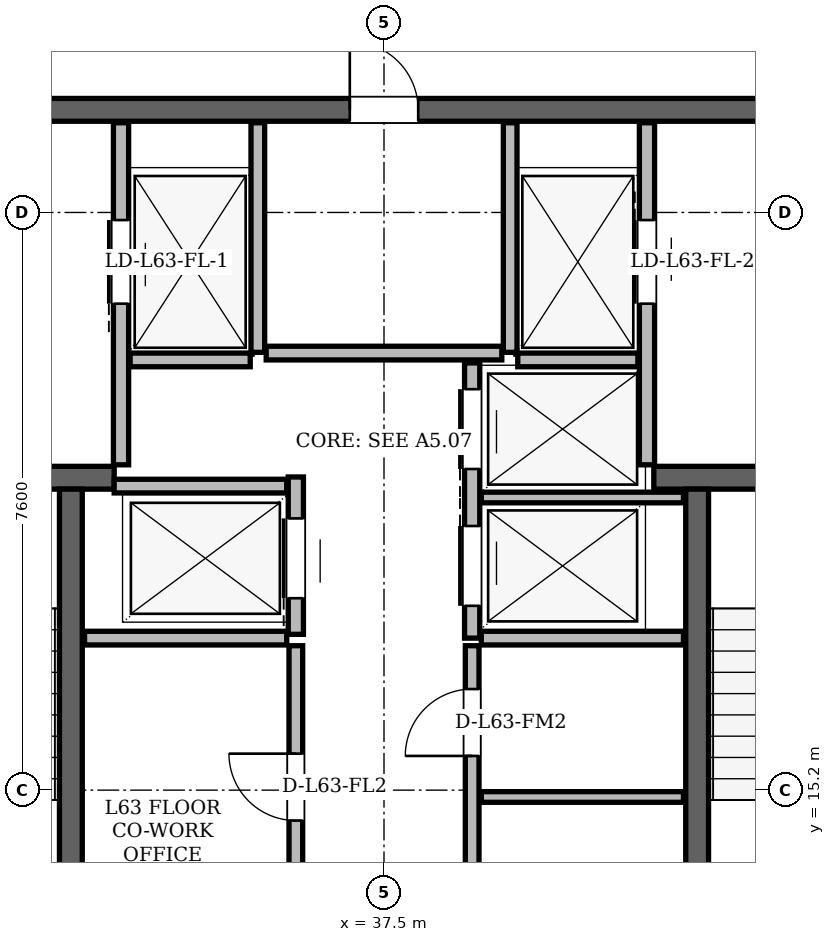
"""IFC4 building model, lengths in metres.
Left out: names, types, materials, properties, quantities, classifications, styles, units other than length and angle.
Written with IfcOpenShell. Run it as: python <this file> out.ifc"""

import sys

from ifc_helpers import new_model, si_unit, direction, frame, frame_2d, origin, place, context, subcontext, project, spatial, rectangle, extrude, element, fill, save


model = new_model("IFC4")
c1 = context("Model", 3, precision=1e-05, world=origin(), true_north=direction((0.0, 1.0)))
c2 = subcontext(c1, "Body", "Model", "MODEL_VIEW")
j1 = project(units=[si_unit("LENGTHUNIT", "METRE"), si_unit("PLANEANGLEUNIT", "RADIAN")], contexts=[c1])
p1 = place(None, origin())
s1 = spatial("IfcSite", under=j1, at=p1, CompositionType="ELEMENT")
p2 = place(p1, origin())
s2 = spatial("IfcBuilding", under=s1, at=p2, CompositionType="ELEMENT")
p3 = place(p2, frame((0.0, 0.0, 237.9)))
s3 = spatial("IfcBuildingStorey", under=s2, at=p3, CompositionType="ELEMENT", Elevation=237.9)
p4 = place(p3, frame((29.65, 24.15, 0.0), z_axis=(0.0, 0.0, 1.0), x_axis=(1.0, 0.0, 0.0)))
e1 = element("IfcWall", 1, at=p4, inside=s3, PredefinedType="SHEAR", context=c2, shape_type="SweptSolid", body=[
    extrude(rectangle(XDim=15.7, YDim=0.3, at=frame_2d((7.85, 0.0))), origin(), (0.0, 0.0, 1.0), 3.38),
])
p5 = place(p4, frame((1.7, 0.0, 0.0)))
e2 = element("IfcOpeningElement", 2, at=p5, cuts=e1, PredefinedType="OPENING", context=c2, shape_type="SweptSolid", body=[
    extrude(rectangle(XDim=1.2, YDim=2.2, at=frame_2d((0.6, 1.1))), frame((0.0, 0.15, 0.0), z_axis=(0.0, -1.0, 0.0), x_axis=(1.0, 0.0, 0.0)), (0.0, 0.0, 1.0), 0.3),
])
p6 = place(p4, frame((12.8, 0.0, 0.0)))
e3 = element("IfcOpeningElement", 3, at=p6, cuts=e1, PredefinedType="OPENING", context=c2, shape_type="SweptSolid", body=[
    extrude(rectangle(XDim=1.2, YDim=2.2, at=frame_2d((0.6, 1.1))), frame((0.0, 0.15, 0.0), z_axis=(0.0, -1.0, 0.0), x_axis=(1.0, 0.0, 0.0)), (0.0, 0.0, 1.0), 0.3),
])
p7 = place(p4, frame((7.4, 0.0, 0.0)))
e4 = element("IfcOpeningElement", 4, at=p7, cuts=e1, PredefinedType="OPENING", context=c2, shape_type="SweptSolid", body=[
    extrude(rectangle(XDim=0.9, YDim=2.05, at=frame_2d((0.45, 1.025))), frame((0.0, 0.15, 0.0), z_axis=(0.0, -1.0, 0.0), x_axis=(1.0, 0.0, 0.0)), (0.0, 0.0, 1.0), 0.3),
])
p8 = place(p3, frame((29.94, 19.31, 0.0), z_axis=(0.0, 0.0, 1.0), x_axis=(1.0, 0.0, 0.0)))
e5 = element("IfcWall", 5, at=p8, inside=s3, PredefinedType="SHEAR", context=c2, shape_type="SweptSolid", body=[
    extrude(rectangle(XDim=4.01, YDim=0.3, at=frame_2d((2.005, 0.0))), origin(), (0.0, 0.0, 1.0), 3.38),
])
p9 = place(p8, frame((1.01, 0.0, 0.0)))
e6 = element("IfcOpeningElement", 6, at=p9, cuts=e5, PredefinedType="OPENING", context=c2, shape_type="SweptSolid", body=[
    extrude(rectangle(XDim=1.4, YDim=2.2, at=frame_2d((0.7, 1.1))), frame((0.0, 0.15, 0.0), z_axis=(0.0, -1.0, 0.0), x_axis=(1.0, 0.0, 0.0)), (0.0, 0.0, 1.0), 0.3),
])
p10 = place(p3, frame((41.05, 19.31, 0.0), z_axis=(0.0, 0.0, 1.0), x_axis=(1.0, 0.0, 0.0)))
e7 = element("IfcWall", 7, at=p10, inside=s3, PredefinedType="SHEAR", context=c2, shape_type="SweptSolid", body=[
    extrude(rectangle(XDim=4.01, YDim=0.3, at=frame_2d((2.005, 0.0))), origin(), (0.0, 0.0, 1.0), 3.38),
])
p11 = place(p10, frame((1.6, 0.0, 0.0)))
e8 = element("IfcOpeningElement", 8, at=p11, cuts=e7, PredefinedType="OPENING", context=c2, shape_type="SweptSolid", body=[
    extrude(rectangle(XDim=1.4, YDim=2.2, at=frame_2d((0.7, 1.1))), frame((0.0, 0.15, 0.0), z_axis=(0.0, -1.0, 0.0), x_axis=(1.0, 0.0, 0.0)), (0.0, 0.0, 1.0), 0.3),
])
for number, where, z_axis, x_axis in (
    (9, (33.38, 11.54, 0.0), (0.0, 0.0, 1.0), (0.0, 1.0, 0.0)),
    (10, (41.62, 11.54, 0.0), (0.0, 0.0, 1.0), (0.0, 1.0, 0.0)),
):
    element("IfcWall", number, at=place(p3, frame(where, z_axis=z_axis, x_axis=x_axis)), inside=s3, PredefinedType="SHEAR", context=c2, shape_type="SweptSolid", body=[
        extrude(rectangle(XDim=7.62, YDim=0.3, at=frame_2d((3.81, 0.0))), origin(), (0.0, 0.0, 1.0), 3.38),
    ])
p12 = place(p3, frame((58.899, 11.151, 0.0), z_axis=(0.0, 0.0, 1.0), x_axis=(-0.500002325133, 0.866024061364, 0.0)))
e11 = element("IfcWall", 11, at=p12, inside=s3, PredefinedType="SOLIDWALL", context=c2, shape_type="SweptSolid", body=[
    extrude(rectangle(XDim=36.9, YDim=0.29, at=frame_2d((18.45, 0.0))), origin(), (0.0, 0.0, 1.0), 2.677),
])
p13 = place(p12, frame((3.429, 0.0, 0.0)))
e12 = element("IfcOpeningElement", 12, at=p13, cuts=e11, PredefinedType="OPENING", context=c2, shape_type="SweptSolid", body=[
    extrude(rectangle(XDim=1.5, YDim=2.2, at=frame_2d((0.75, 1.1))), frame((0.0, 0.145, 0.0), z_axis=(0.0, -1.0, 0.0), x_axis=(1.0, 0.0, 0.0)), (0.0, 0.0, 1.0), 0.29),
])
p14 = place(p12, frame((27.156, 0.0, 0.0)))
e13 = element("IfcOpeningElement", 13, at=p14, cuts=e11, PredefinedType="OPENING", context=c2, shape_type="SweptSolid", body=[
    extrude(rectangle(XDim=1.5, YDim=2.2, at=frame_2d((0.75, 1.1))), frame((0.0, 0.145, 0.0), z_axis=(0.0, -1.0, 0.0), x_axis=(1.0, 0.0, 0.0)), (0.0, 0.0, 1.0), 0.29),
])
p15 = place(p12, frame((6.97, 0.0, 0.85)))
e14 = element("IfcOpeningElement", 14, at=p15, cuts=e11, PredefinedType="OPENING", context=c2, shape_type="SweptSolid", body=[
    extrude(rectangle(XDim=1.6, YDim=1.7, at=frame_2d((0.8, 0.85))), frame((0.0, 0.145, 0.0), z_axis=(0.0, -1.0, 0.0), x_axis=(1.0, 0.0, 0.0)), (0.0, 0.0, 1.0), 0.29),
])
p16 = place(p12, frame((1.106, 0.0, 0.85)))
e15 = element("IfcOpeningElement", 15, at=p16, cuts=e11, PredefinedType="OPENING", context=c2, shape_type="SweptSolid", body=[
    extrude(rectangle(XDim=1.6, YDim=1.7, at=frame_2d((0.8, 0.85))), frame((0.0, 0.145, 0.0), z_axis=(0.0, -1.0, 0.0), x_axis=(1.0, 0.0, 0.0)), (0.0, 0.0, 1.0), 0.29),
])
p17 = place(p12, frame((34.697, 0.0, 0.85)))
e16 = element("IfcOpeningElement", 16, at=p17, cuts=e11, PredefinedType="OPENING", context=c2, shape_type="SweptSolid", body=[
    extrude(rectangle(XDim=1.2, YDim=1.48, at=frame_2d((0.6, 0.74))), frame((0.0, 0.145, 0.0), z_axis=(0.0, -1.0, 0.0), x_axis=(1.0, 0.0, 0.0)), (0.0, 0.0, 1.0), 0.29),
])
p18 = place(p12, frame((16.774, 0.0, 0.85)))
e17 = element("IfcOpeningElement", 17, at=p18, cuts=e11, PredefinedType="OPENING", context=c2, shape_type="SweptSolid", body=[
    extrude(rectangle(XDim=2.2, YDim=1.717, at=frame_2d((1.1, 0.858))), frame((0.0, 0.145, 0.0), z_axis=(0.0, -1.0, 0.0), x_axis=(1.0, 0.0, 0.0)), (0.0, 0.0, 1.0), 0.29),
])
p19 = place(p12, frame((22.799, 0.0, 0.85)))
e18 = element("IfcOpeningElement", 18, at=p19, cuts=e11, PredefinedType="OPENING", context=c2, shape_type="SweptSolid", body=[
    extrude(rectangle(XDim=1.6, YDim=1.7, at=frame_2d((0.8, 0.85))), frame((0.0, 0.145, 0.0), z_axis=(0.0, -1.0, 0.0), x_axis=(1.0, 0.0, 0.0)), (0.0, 0.0, 1.0), 0.29),
])
p20 = place(p12, frame((29.059, 0.0, 0.85)))
e19 = element("IfcOpeningElement", 19, at=p20, cuts=e11, PredefinedType="OPENING", context=c2, shape_type="SweptSolid", body=[
    extrude(rectangle(XDim=1.2, YDim=1.48, at=frame_2d((0.6, 0.74))), frame((0.0, 0.145, 0.0), z_axis=(0.0, -1.0, 0.0), x_axis=(1.0, 0.0, 0.0)), (0.0, 0.0, 1.0), 0.29),
])
p21 = place(p12, frame((31.635, 0.0, 0.85)))
e20 = element("IfcOpeningElement", 20, at=p21, cuts=e11, PredefinedType="OPENING", context=c2, shape_type="SweptSolid", body=[
    extrude(rectangle(XDim=1.2, YDim=1.48, at=frame_2d((0.6, 0.74))), frame((0.0, 0.145, 0.0), z_axis=(0.0, -1.0, 0.0), x_axis=(1.0, 0.0, 0.0)), (0.0, 0.0, 1.0), 0.29),
])
p22 = place(p12, frame((12.419, 0.0, 0.85)))
e21 = element("IfcOpeningElement", 21, at=p22, cuts=e11, PredefinedType="OPENING", context=c2, shape_type="SweptSolid", body=[
    extrude(rectangle(XDim=1.2, YDim=1.48, at=frame_2d((0.6, 0.74))), frame((0.0, 0.145, 0.0), z_axis=(0.0, -1.0, 0.0), x_axis=(1.0, 0.0, 0.0)), (0.0, 0.0, 1.0), 0.29),
])
p23 = place(p3, frame((34.551, 43.107, 0.0), z_axis=(0.0, 0.0, 1.0), x_axis=(-0.500002325133, -0.866024061364, 0.0)))
e22 = element("IfcWall", 22, at=p23, inside=s3, PredefinedType="SOLIDWALL", context=c2, shape_type="SweptSolid", body=[
    extrude(rectangle(XDim=36.9, YDim=0.29, at=frame_2d((18.45, 0.0))), origin(), (0.0, 0.0, 1.0), 2.677),
])
p24 = place(p23, frame((3.429, 0.0, 0.0)))
e23 = element("IfcOpeningElement", 23, at=p24, cuts=e22, PredefinedType="OPENING", context=c2, shape_type="SweptSolid", body=[
    extrude(rectangle(XDim=1.5, YDim=2.2, at=frame_2d((0.75, 1.1))), frame((0.0, 0.145, 0.0), z_axis=(0.0, -1.0, 0.0), x_axis=(1.0, 0.0, 0.0)), (0.0, 0.0, 1.0), 0.29),
])
p25 = place(p23, frame((28.625, 0.0, 0.0)))
e24 = element("IfcOpeningElement", 24, at=p25, cuts=e22, PredefinedType="OPENING", context=c2, shape_type="SweptSolid", body=[
    extrude(rectangle(XDim=1.5, YDim=2.2, at=frame_2d((0.75, 1.1))), frame((0.0, 0.145, 0.0), z_axis=(0.0, -1.0, 0.0), x_axis=(1.0, 0.0, 0.0)), (0.0, 0.0, 1.0), 0.29),
])
p26 = place(p23, frame((21.887, 0.0, 0.85)))
e25 = element("IfcOpeningElement", 25, at=p26, cuts=e22, PredefinedType="OPENING", context=c2, shape_type="SweptSolid", body=[
    extrude(rectangle(XDim=2.4, YDim=1.717, at=frame_2d((1.2, 0.858))), frame((0.0, 0.145, 0.0), z_axis=(0.0, -1.0, 0.0), x_axis=(1.0, 0.0, 0.0)), (0.0, 0.0, 1.0), 0.29),
])
p27 = place(p23, frame((34.716, 0.0, 0.85)))
e26 = element("IfcOpeningElement", 26, at=p27, cuts=e22, PredefinedType="OPENING", context=c2, shape_type="SweptSolid", body=[
    extrude(rectangle(XDim=1.2, YDim=1.48, at=frame_2d((0.6, 0.74))), frame((0.0, 0.145, 0.0), z_axis=(0.0, -1.0, 0.0), x_axis=(1.0, 0.0, 0.0)), (0.0, 0.0, 1.0), 0.29),
])
p28 = place(p23, frame((32.59, 0.0, 0.85)))
e27 = element("IfcOpeningElement", 27, at=p28, cuts=e22, PredefinedType="OPENING", context=c2, shape_type="SweptSolid", body=[
    extrude(rectangle(XDim=1.2, YDim=1.48, at=frame_2d((0.6, 0.74))), frame((0.0, 0.145, 0.0), z_axis=(0.0, -1.0, 0.0), x_axis=(1.0, 0.0, 0.0)), (0.0, 0.0, 1.0), 0.29),
])
p29 = place(p23, frame((12.187, 0.0, 0.85)))
e28 = element("IfcOpeningElement", 28, at=p29, cuts=e22, PredefinedType="OPENING", context=c2, shape_type="SweptSolid", body=[
    extrude(rectangle(XDim=1.2, YDim=1.48, at=frame_2d((0.6, 0.74))), frame((0.0, 0.145, 0.0), z_axis=(0.0, -1.0, 0.0), x_axis=(1.0, 0.0, 0.0)), (0.0, 0.0, 1.0), 0.29),
])
p30 = place(p23, frame((16.565, 0.0, 0.85)))
e29 = element("IfcOpeningElement", 29, at=p30, cuts=e22, PredefinedType="OPENING", context=c2, shape_type="SweptSolid", body=[
    extrude(rectangle(XDim=2.0, YDim=1.717, at=frame_2d((1.0, 0.858))), frame((0.0, 0.145, 0.0), z_axis=(0.0, -1.0, 0.0), x_axis=(1.0, 0.0, 0.0)), (0.0, 0.0, 1.0), 0.29),
])
p31 = place(p23, frame((6.94, 0.0, 0.85)))
e30 = element("IfcOpeningElement", 30, at=p31, cuts=e22, PredefinedType="OPENING", context=c2, shape_type="SweptSolid", body=[
    extrude(rectangle(XDim=1.2, YDim=1.48, at=frame_2d((0.6, 0.74))), frame((0.0, 0.145, 0.0), z_axis=(0.0, -1.0, 0.0), x_axis=(1.0, 0.0, 0.0)), (0.0, 0.0, 1.0), 0.29),
])
p32 = place(p3, frame((34.04, 19.48, 0.0), z_axis=(0.0, 0.0, 1.0), x_axis=(0.0, 1.0, 0.0)))
e31 = element("IfcWall", 31, at=p32, inside=s3, PredefinedType="PARTITIONING", context=c2, shape_type="SweptSolid", body=[
    extrude(rectangle(XDim=4.5, YDim=0.2, at=frame_2d((2.25, 0.0))), origin(), (0.0, 0.0, 1.0), 3.38),
])
p33 = place(p32, frame((2.12, 0.0, 0.0)))
e32 = element("IfcOpeningElement", 32, at=p33, cuts=e31, PredefinedType="OPENING", context=c2, shape_type="SweptSolid", body=[
    extrude(rectangle(XDim=1.1, YDim=2.2, at=frame_2d((0.55, 1.1))), frame((0.0, 0.1, 0.0), z_axis=(0.0, -1.0, 0.0), x_axis=(1.0, 0.0, 0.0)), (0.0, 0.0, 1.0), 0.2),
])
p34 = place(p3, frame((35.84, 20.96, 0.0), z_axis=(0.0, 0.0, 1.0), x_axis=(0.0, 1.0, 0.0)))
e33 = element("IfcWall", 33, at=p34, inside=s3, PredefinedType="PARTITIONING", context=c2, shape_type="SweptSolid", body=[
    extrude(rectangle(XDim=3.02, YDim=0.18, at=frame_2d((1.51, 0.0))), origin(), (0.0, 0.0, 1.0), 3.38),
])
p35 = place(p3, frame((34.16, 20.86, 0.0), z_axis=(0.0, 0.0, 1.0), x_axis=(1.0, 0.0, 0.0)))
e34 = element("IfcWall", 34, at=p35, inside=s3, PredefinedType="PARTITIONING", context=c2, shape_type="SweptSolid", body=[
    extrude(rectangle(XDim=1.58, YDim=0.18, at=frame_2d((0.79, 0.0))), origin(), (0.0, 0.0, 1.0), 3.38),
])
p36 = place(p3, frame((40.96, 19.48, 0.0), z_axis=(0.0, 0.0, 1.0), x_axis=(0.0, 1.0, 0.0)))
e35 = element("IfcWall", 35, at=p36, inside=s3, PredefinedType="PARTITIONING", context=c2, shape_type="SweptSolid", body=[
    extrude(rectangle(XDim=4.5, YDim=0.2, at=frame_2d((2.25, 0.0))), origin(), (0.0, 0.0, 1.0), 3.38),
])
p37 = place(p36, frame((2.12, 0.0, 0.0)))
e36 = element("IfcOpeningElement", 36, at=p37, cuts=e35, PredefinedType="OPENING", context=c2, shape_type="SweptSolid", body=[
    extrude(rectangle(XDim=1.1, YDim=2.2, at=frame_2d((0.55, 1.1))), frame((0.0, 0.1, 0.0), z_axis=(0.0, -1.0, 0.0), x_axis=(1.0, 0.0, 0.0)), (0.0, 0.0, 1.0), 0.2),
])
p38 = place(p3, frame((39.16, 20.96, 0.0), z_axis=(0.0, 0.0, 1.0), x_axis=(0.0, 1.0, 0.0)))
e37 = element("IfcWall", 37, at=p38, inside=s3, PredefinedType="PARTITIONING", context=c2, shape_type="SweptSolid", body=[
    extrude(rectangle(XDim=3.02, YDim=0.18, at=frame_2d((1.51, 0.0))), origin(), (0.0, 0.0, 1.0), 3.38),
])
p39 = place(p3, frame((39.26, 20.86, 0.0), z_axis=(0.0, 0.0, 1.0), x_axis=(1.0, 0.0, 0.0)))
e38 = element("IfcWall", 38, at=p39, inside=s3, PredefinedType="PARTITIONING", context=c2, shape_type="SweptSolid", body=[
    extrude(rectangle(XDim=1.58, YDim=0.18, at=frame_2d((0.79, 0.0))), origin(), (0.0, 0.0, 1.0), 3.38),
])
p40 = place(p3, frame((36.34, 17.25, 0.0), z_axis=(0.0, 0.0, 1.0), x_axis=(0.0, 1.0, 0.0)))
e39 = element("IfcWall", 39, at=p40, inside=s3, PredefinedType="PARTITIONING", context=c2, shape_type="SweptSolid", body=[
    extrude(rectangle(XDim=2.07, YDim=0.2, at=frame_2d((1.035, 0.0))), origin(), (0.0, 0.0, 1.0), 3.38),
])
p41 = place(p40, frame((0.475, 0.0, 0.0)))
e40 = element("IfcOpeningElement", 40, at=p41, cuts=e39, PredefinedType="OPENING", context=c2, shape_type="SweptSolid", body=[
    extrude(rectangle(XDim=1.05, YDim=2.15, at=frame_2d((0.525, 1.075))), frame((0.0, 0.1, 0.0), z_axis=(0.0, -1.0, 0.0), x_axis=(1.0, 0.0, 0.0)), (0.0, 0.0, 1.0), 0.2),
])
p42 = place(p3, frame((33.95, 19.2, 0.0), z_axis=(0.0, 0.0, 1.0), x_axis=(1.0, 0.0, 0.0)))
e41 = element("IfcWall", 41, at=p42, inside=s3, PredefinedType="PARTITIONING", context=c2, shape_type="SweptSolid", body=[
    extrude(rectangle(XDim=2.27, YDim=0.18, at=frame_2d((1.135, 0.0))), origin(), (0.0, 0.0, 1.0), 3.38),
])
p43 = place(p3, frame((33.56, 17.2, 0.0), z_axis=(0.0, 0.0, 1.0), x_axis=(1.0, 0.0, 0.0)))
e42 = element("IfcWall", 42, at=p43, inside=s3, PredefinedType="PARTITIONING", context=c2, shape_type="SweptSolid", body=[
    extrude(rectangle(XDim=2.66, YDim=0.18, at=frame_2d((1.33, 0.0))), origin(), (0.0, 0.0, 1.0), 3.38),
])
p44 = place(p3, frame((36.34, 11.55, 0.0), z_axis=(0.0, 0.0, 1.0), x_axis=(0.0, 1.0, 0.0)))
e43 = element("IfcWall", 43, at=p44, inside=s3, PredefinedType="PARTITIONING", context=c2, shape_type="SweptSolid", body=[
    extrude(rectangle(XDim=5.55, YDim=0.18, at=frame_2d((2.775, 0.0))), origin(), (0.0, 0.0, 1.0), 3.38),
])
p45 = place(p44, frame((0.55, 0.0, 0.0)))
e44 = element("IfcOpeningElement", 44, at=p45, cuts=e43, PredefinedType="OPENING", context=c2, shape_type="SweptSolid", body=[
    extrude(rectangle(XDim=0.88, YDim=2.08, at=frame_2d((0.44, 1.04))), frame((0.0, 0.09, 0.0), z_axis=(0.0, -1.0, 0.0), x_axis=(1.0, 0.0, 0.0)), (0.0, 0.0, 1.0), 0.18),
])
p46 = place(p44, frame((3.25, 0.0, 0.0)))
e45 = element("IfcOpeningElement", 45, at=p46, cuts=e43, PredefinedType="OPENING", context=c2, shape_type="SweptSolid", body=[
    extrude(rectangle(XDim=0.88, YDim=2.08, at=frame_2d((0.44, 1.04))), frame((0.0, 0.09, 0.0), z_axis=(0.0, -1.0, 0.0), x_axis=(1.0, 0.0, 0.0)), (0.0, 0.0, 1.0), 0.18),
])
p47 = place(p3, frame((38.66, 17.2, 0.0), z_axis=(0.0, 0.0, 1.0), x_axis=(0.0, 1.0, 0.0)))
e46 = element("IfcWall", 46, at=p47, inside=s3, PredefinedType="PARTITIONING", context=c2, shape_type="SweptSolid", body=[
    extrude(rectangle(XDim=3.62, YDim=0.2, at=frame_2d((1.81, 0.0))), origin(), (0.0, 0.0, 1.0), 3.38),
])
p48 = place(p47, frame((0.425, 0.0, 0.0)))
e47 = element("IfcOpeningElement", 47, at=p48, cuts=e46, PredefinedType="OPENING", context=c2, shape_type="SweptSolid", body=[
    extrude(rectangle(XDim=1.05, YDim=2.15, at=frame_2d((0.525, 1.075))), frame((0.0, 0.1, 0.0), z_axis=(0.0, -1.0, 0.0), x_axis=(1.0, 0.0, 0.0)), (0.0, 0.0, 1.0), 0.2),
])
p49 = place(p47, frame((2.225, 0.0, 0.0)))
e48 = element("IfcOpeningElement", 48, at=p49, cuts=e46, PredefinedType="OPENING", context=c2, shape_type="SweptSolid", body=[
    extrude(rectangle(XDim=1.05, YDim=2.15, at=frame_2d((0.525, 1.075))), frame((0.0, 0.1, 0.0), z_axis=(0.0, -1.0, 0.0), x_axis=(1.0, 0.0, 0.0)), (0.0, 0.0, 1.0), 0.2),
])
p50 = place(p3, frame((38.78, 17.2, 0.0), z_axis=(0.0, 0.0, 1.0), x_axis=(1.0, 0.0, 0.0)))
e49 = element("IfcWall", 49, at=p50, inside=s3, PredefinedType="PARTITIONING", context=c2, shape_type="SweptSolid", body=[
    extrude(rectangle(XDim=2.66, YDim=0.18, at=frame_2d((1.33, 0.0))), origin(), (0.0, 0.0, 1.0), 3.38),
])
p51 = place(p3, frame((38.78, 19.05, 0.0), z_axis=(0.0, 0.0, 1.0), x_axis=(1.0, 0.0, 0.0)))
e50 = element("IfcWall", 50, at=p51, inside=s3, PredefinedType="PARTITIONING", context=c2, shape_type="SweptSolid", body=[
    extrude(rectangle(XDim=2.66, YDim=0.14, at=frame_2d((1.33, 0.0))), origin(), (0.0, 0.0, 1.0), 3.38),
])
p52 = place(p3, frame((38.66, 11.55, 0.0), z_axis=(0.0, 0.0, 1.0), x_axis=(0.0, 1.0, 0.0)))
e51 = element("IfcWall", 51, at=p52, inside=s3, PredefinedType="PARTITIONING", context=c2, shape_type="SweptSolid", body=[
    extrude(rectangle(XDim=5.55, YDim=0.18, at=frame_2d((2.775, 0.0))), origin(), (0.0, 0.0, 1.0), 3.38),
])
p53 = place(p52, frame((1.35, 0.0, 0.0)))
e52 = element("IfcOpeningElement", 52, at=p53, cuts=e51, PredefinedType="OPENING", context=c2, shape_type="SweptSolid", body=[
    extrude(rectangle(XDim=0.88, YDim=2.08, at=frame_2d((0.44, 1.04))), frame((0.0, 0.09, 0.0), z_axis=(0.0, -1.0, 0.0), x_axis=(1.0, 0.0, 0.0)), (0.0, 0.0, 1.0), 0.18),
])
p54 = place(p52, frame((4.1, 0.0, 0.0)))
e53 = element("IfcOpeningElement", 53, at=p54, cuts=e51, PredefinedType="OPENING", context=c2, shape_type="SweptSolid", body=[
    extrude(rectangle(XDim=0.88, YDim=2.08, at=frame_2d((0.44, 1.04))), frame((0.0, 0.09, 0.0), z_axis=(0.0, -1.0, 0.0), x_axis=(1.0, 0.0, 0.0)), (0.0, 0.0, 1.0), 0.18),
])
p55 = place(p3, frame((38.78, 15.11, 0.0), z_axis=(0.0, 0.0, 1.0), x_axis=(1.0, 0.0, 0.0)))
e54 = element("IfcWall", 54, at=p55, inside=s3, PredefinedType="PARTITIONING", context=c2, shape_type="SweptSolid", body=[
    extrude(rectangle(XDim=2.66, YDim=0.14, at=frame_2d((1.33, 0.0))), origin(), (0.0, 0.0, 1.0), 3.38),
])
p56 = place(p3, frame((35.95, 20.95, 0.0), z_axis=(0.0, 0.0, 1.0), x_axis=(1.0, 0.0, 0.0)))
e55 = element("IfcWall", 55, at=p56, inside=s3, PredefinedType="PARTITIONING", context=c2, shape_type="SweptSolid", body=[
    extrude(rectangle(XDim=3.1, YDim=0.18, at=frame_2d((1.55, 0.0))), origin(), (0.0, 0.0, 1.0), 3.38),
])
p57 = place(p46, origin())
e56 = element("IfcDoor", 56, at=p57, inside=s3, OperationType="SINGLE_SWING_RIGHT", PredefinedType="DOOR", context=c2, shape_type="SweptSolid", body=[
    extrude(rectangle(XDim=0.88, YDim=2.08, at=frame_2d((0.44, 1.04))), frame((0.0, 0.025, 0.0), z_axis=(0.0, -1.0, 0.0), x_axis=(1.0, 0.0, 0.0)), (0.0, 0.0, 1.0), 0.05),
])
fill(e45, e56)
p58 = place(p54, origin())
e57 = element("IfcDoor", 57, at=p58, inside=s3, OperationType="SINGLE_SWING_LEFT", PredefinedType="DOOR", context=c2, shape_type="SweptSolid", body=[
    extrude(rectangle(XDim=0.88, YDim=2.08, at=frame_2d((0.44, 1.04))), frame((0.0, 0.025, 0.0), z_axis=(0.0, -1.0, 0.0), x_axis=(1.0, 0.0, 0.0)), (0.0, 0.0, 1.0), 0.05),
])
fill(e53, e57)
p59 = place(p33, origin())
e58 = element("IfcDoor", 58, at=p59, inside=s3, OperationType="SLIDING_TO_LEFT", PredefinedType="DOOR", context=c2, shape_type="SweptSolid", body=[
    extrude(rectangle(XDim=1.1, YDim=2.2, at=frame_2d((0.55, 1.1))), frame((0.0, 0.025, 0.0), z_axis=(0.0, -1.0, 0.0), x_axis=(1.0, 0.0, 0.0)), (0.0, 0.0, 1.0), 0.05),
])
fill(e32, e58)
p60 = place(p37, origin())
e59 = element("IfcDoor", 59, at=p60, inside=s3, OperationType="SLIDING_TO_RIGHT", PredefinedType="DOOR", context=c2, shape_type="SweptSolid", body=[
    extrude(rectangle(XDim=1.1, YDim=2.2, at=frame_2d((0.55, 1.1))), frame((0.0, 0.025, 0.0), z_axis=(0.0, -1.0, 0.0), x_axis=(1.0, 0.0, 0.0)), (0.0, 0.0, 1.0), 0.05),
])
fill(e36, e59)
p61 = place(p41, origin())
e60 = element("IfcDoor", 60, at=p61, inside=s3, OperationType="SLIDING_TO_LEFT", PredefinedType="DOOR", context=c2, shape_type="SweptSolid", body=[
    extrude(rectangle(XDim=1.05, YDim=2.15, at=frame_2d((0.525, 1.075))), frame((0.0, 0.025, 0.0), z_axis=(0.0, -1.0, 0.0), x_axis=(1.0, 0.0, 0.0)), (0.0, 0.0, 1.0), 0.05),
])
fill(e40, e60)
p62 = place(p48, origin())
e61 = element("IfcDoor", 61, at=p62, inside=s3, OperationType="SLIDING_TO_RIGHT", PredefinedType="DOOR", context=c2, shape_type="SweptSolid", body=[
    extrude(rectangle(XDim=1.05, YDim=2.15, at=frame_2d((0.525, 1.075))), frame((0.0, 0.025, 0.0), z_axis=(0.0, -1.0, 0.0), x_axis=(1.0, 0.0, 0.0)), (0.0, 0.0, 1.0), 0.05),
])
fill(e47, e61)
p63 = place(p49, origin())
e62 = element("IfcDoor", 62, at=p63, inside=s3, OperationType="SLIDING_TO_LEFT", PredefinedType="DOOR", context=c2, shape_type="SweptSolid", body=[
    extrude(rectangle(XDim=1.05, YDim=2.15, at=frame_2d((0.525, 1.075))), frame((0.0, 0.025, 0.0), z_axis=(0.0, -1.0, 0.0), x_axis=(1.0, 0.0, 0.0)), (0.0, 0.0, 1.0), 0.05),
])
fill(e48, e62)
p64 = place(p7, origin())
e63 = element("IfcDoor", 63, at=p64, inside=s3, OperationType="SINGLE_SWING_LEFT", PredefinedType="DOOR", context=c2, shape_type="SweptSolid", body=[
    extrude(rectangle(XDim=0.9, YDim=2.05, at=frame_2d((0.45, 1.025))), frame((0.0, 0.025, 0.0), z_axis=(0.0, -1.0, 0.0), x_axis=(1.0, 0.0, 0.0)), (0.0, 0.0, 1.0), 0.05),
])
fill(e4, e63)
save(model, sys.argv[1])
